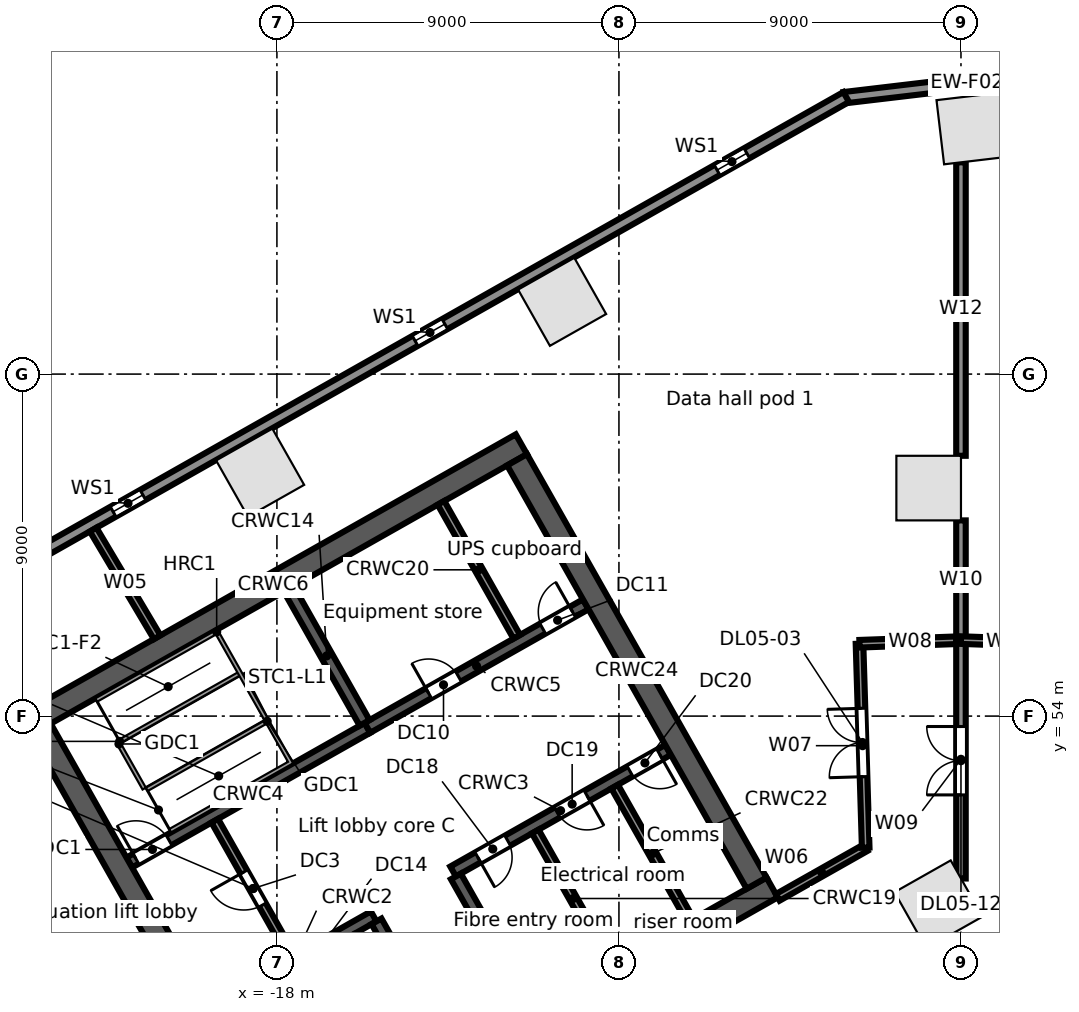
"""IFC4 building model, lengths in metres.
Left out: names, types, materials, properties, quantities, classifications, styles, units other than length and angle.
Written with IfcOpenShell. Run it as: python <this file> out.ifc"""

import sys

from ifc_helpers import new_model, si_unit, direction, frame, frame_2d, origin, origin_2d, place, context, subcontext, project, spatial, rectangle, extrude, element, fill, save


model = new_model("IFC4")
c1 = context("Model", 3, precision=1e-05, world=origin(), true_north=direction((0.0, 1.0)))
c2 = subcontext(c1, "Body", "Model", "MODEL_VIEW")
j1 = project(units=[si_unit("LENGTHUNIT", "METRE"), si_unit("PLANEANGLEUNIT", "RADIAN")], contexts=[c1])
p1 = place(None, origin())
s1 = spatial("IfcSite", under=j1, at=p1, CompositionType="ELEMENT")
p2 = place(p1, origin())
s2 = spatial("IfcBuilding", under=s1, at=p2, CompositionType="ELEMENT")
p3 = place(p2, frame((0.0, 0.0, 31.5)))
s3 = spatial("IfcBuildingStorey", under=s2, at=p3, CompositionType="ELEMENT", Elevation=31.5)
for number, where, z_axis, x_axis in (
    (1, (0.3, 69.464, 0.0), (0.0, 0.0, 1.0), (-0.993, -0.118, 0.0)),
    (2, (-10.495, 64.902, 0.0), (0.0, 0.0, 1.0), (-0.87, -0.492, 0.0)),
    (3, (-18.441, 60.406, 0.0), (0.0, 0.0, 1.0), (-0.87, -0.492, 0.0)),
    (4, (-0.591, 49.044, 0.0), (0.0, 0.0, 1.0), (0.87, 0.492, 0.0)),
    (5, (-0.85, 60.0, 0.0), (0.0, 0.0, 1.0), (0.0, 1.0, 0.0)),
):
    element("IfcColumn", number, at=place(p3, frame(where, z_axis=z_axis, x_axis=x_axis)), inside=s3, PredefinedType="COLUMN", context=c2, shape_type="SweptSolid", body=[
        extrude(rectangle(XDim=1.7, YDim=1.7, at=origin_2d()), origin(), (0.0, 0.0, 1.0), 5.0),
    ])
p4 = place(p3, frame((-3.076, 70.273, 0.0), z_axis=(0.0, 0.0, 1.0), x_axis=(0.993067743007, 0.117543429416, 0.0)))
e6 = element("IfcWall", 6, at=p4, inside=s3, PredefinedType="STANDARD", context=c2, shape_type="SweptSolid", body=[
    extrude(rectangle(XDim=6.516, YDim=0.3, at=frame_2d((3.258, 0.0))), origin(), (0.0, 0.0, 1.0), 4.68),
])
p5 = place(p3, frame((-58.745, 38.764, 0.0), z_axis=(0.0, 0.0, 1.0), x_axis=(0.870355811726, 0.492423355453, 0.0)))
e7 = element("IfcWall", 7, at=p5, inside=s3, PredefinedType="STANDARD", context=c2, shape_type="SweptSolid", body=[
    extrude(rectangle(XDim=64.025, YDim=0.3, at=frame_2d((32.013, 0.0))), origin(), (0.0, 0.0, 1.0), 4.68),
])
p6 = place(p5, frame((60.122, 0.0, 0.6)))
e8 = element("IfcOpeningElement", 8, at=p6, cuts=e7, PredefinedType="OPENING", context=c2, shape_type="SweptSolid", body=[
    extrude(rectangle(XDim=0.9, YDim=3.2, at=frame_2d((0.45, 1.6))), frame((0.0, 0.16, 0.0), z_axis=(0.0, -1.0, 0.0), x_axis=(1.0, 0.0, 0.0)), (0.0, 0.0, 1.0), 0.32),
])
p7 = place(p5, frame((50.992, 0.0, 0.6)))
e9 = element("IfcOpeningElement", 9, at=p7, cuts=e7, PredefinedType="OPENING", context=c2, shape_type="SweptSolid", body=[
    extrude(rectangle(XDim=0.9, YDim=3.2, at=frame_2d((0.45, 1.6))), frame((0.0, 0.16, 0.0), z_axis=(0.0, -1.0, 0.0), x_axis=(1.0, 0.0, 0.0)), (0.0, 0.0, 1.0), 0.32),
])
p8 = place(p5, frame((41.862, 0.0, 0.6)))
e10 = element("IfcOpeningElement", 10, at=p8, cuts=e7, PredefinedType="OPENING", context=c2, shape_type="SweptSolid", body=[
    extrude(rectangle(XDim=0.9, YDim=3.2, at=frame_2d((0.45, 1.6))), frame((0.0, 0.16, 0.0), z_axis=(0.0, -1.0, 0.0), x_axis=(1.0, 0.0, 0.0)), (0.0, 0.0, 1.0), 0.32),
])
p9 = place(p5, frame((32.732, 0.0, 0.6)))
e11 = element("IfcOpeningElement", 11, at=p9, cuts=e7, PredefinedType="OPENING", context=c2, shape_type="SweptSolid", body=[
    extrude(rectangle(XDim=0.9, YDim=3.2, at=frame_2d((0.45, 1.6))), frame((0.0, 0.16, 0.0), z_axis=(0.0, -1.0, 0.0), x_axis=(1.0, 0.0, 0.0)), (0.0, 0.0, 1.0), 0.32),
])
p10 = place(p5, frame((23.602, 0.0, 0.6)))
e12 = element("IfcOpeningElement", 12, at=p10, cuts=e7, PredefinedType="OPENING", context=c2, shape_type="SweptSolid", body=[
    extrude(rectangle(XDim=0.9, YDim=3.2, at=frame_2d((0.45, 1.6))), frame((0.0, 0.16, 0.0), z_axis=(0.0, -1.0, 0.0), x_axis=(1.0, 0.0, 0.0)), (0.0, 0.0, 1.0), 0.32),
])
p11 = place(p5, frame((14.472, 0.0, 0.6)))
e13 = element("IfcOpeningElement", 13, at=p11, cuts=e7, PredefinedType="OPENING", context=c2, shape_type="SweptSolid", body=[
    extrude(rectangle(XDim=0.9, YDim=3.2, at=frame_2d((0.45, 1.6))), frame((0.0, 0.16, 0.0), z_axis=(0.0, -1.0, 0.0), x_axis=(1.0, 0.0, 0.0)), (0.0, 0.0, 1.0), 0.32),
])
p12 = place(p5, frame((5.342, 0.0, 0.6)))
e14 = element("IfcOpeningElement", 14, at=p12, cuts=e7, PredefinedType="OPENING", context=c2, shape_type="SweptSolid", body=[
    extrude(rectangle(XDim=0.9, YDim=3.2, at=frame_2d((0.45, 1.6))), frame((0.0, 0.16, 0.0), z_axis=(0.0, -1.0, 0.0), x_axis=(1.0, 0.0, 0.0)), (0.0, 0.0, 1.0), 0.32),
])
p13 = place(p3, frame((-18.024, 42.104, 0.0), z_axis=(0.0, 0.0, 1.0), x_axis=(0.870360574057, 0.492414937962, 0.0)))
e15 = element("IfcWall", 15, at=p13, inside=s3, PredefinedType="SOLIDWALL", context=c2, shape_type="SweptSolid", body=[
    extrude(rectangle(XDim=15.0, YDim=0.6, at=frame_2d((7.5, 0.0))), origin(), (0.0, 0.0, 1.0), 4.68),
])
p14 = place(p13, frame((6.1, 0.0, 0.0)))
e16 = element("IfcOpeningElement", 16, at=p14, cuts=e15, PredefinedType="OPENING", context=c2, shape_type="SweptSolid", body=[
    extrude(rectangle(XDim=1.2, YDim=2.1, at=frame_2d((0.6, 1.05))), frame((0.0, 0.31, 0.0), z_axis=(0.0, -1.0, 0.0), x_axis=(1.0, 0.0, 0.0)), (0.0, 0.0, 1.0), 0.62),
])
p15 = place(p3, frame((-19.718, 46.316, 0.0), z_axis=(0.0, 0.0, 1.0), x_axis=(0.870353963862, 0.492426621528, 0.0)))
e17 = element("IfcWall", 17, at=p15, inside=s3, PredefinedType="SOLIDWALL", context=c2, shape_type="SweptSolid", body=[
    extrude(rectangle(XDim=4.9, YDim=0.3, at=frame_2d((2.45, 0.0))), origin(), (0.0, 0.0, 1.0), 4.68),
])
p16 = place(p15, frame((0.55, 0.0, 0.0)))
e18 = element("IfcOpeningElement", 18, at=p16, cuts=e17, PredefinedType="OPENING", context=c2, shape_type="SweptSolid", body=[
    extrude(rectangle(XDim=1.1, YDim=2.1, at=frame_2d((0.55, 1.05))), frame((0.0, 0.16, 0.0), z_axis=(0.0, -1.0, 0.0), x_axis=(1.0, 0.0, 0.0)), (0.0, 0.0, 1.0), 0.32),
])
p17 = place(p15, frame((2.85, 0.0, 0.0)))
e19 = element("IfcOpeningElement", 19, at=p17, cuts=e17, PredefinedType="OPENING", context=c2, shape_type="SweptSolid", body=[
    extrude(rectangle(XDim=0.9, YDim=2.1, at=frame_2d((0.45, 1.05))), frame((0.0, 0.16, 0.0), z_axis=(0.0, -1.0, 0.0), x_axis=(1.0, 0.0, 0.0)), (0.0, 0.0, 1.0), 0.32),
])
p18 = place(p3, frame((-13.365, 49.911, 0.0), z_axis=(0.0, 0.0, 1.0), x_axis=(0.870340995471, 0.49244954219, 0.0)))
e20 = element("IfcWall", 20, at=p18, inside=s3, PredefinedType="SOLIDWALL", context=c2, shape_type="SweptSolid", body=[
    extrude(rectangle(XDim=6.5, YDim=0.3, at=frame_2d((3.25, 0.0))), origin(), (0.0, 0.0, 1.0), 4.68),
])
p19 = place(p18, frame((0.75, 0.0, 0.0)))
e21 = element("IfcOpeningElement", 21, at=p19, cuts=e20, PredefinedType="OPENING", context=c2, shape_type="SweptSolid", body=[
    extrude(rectangle(XDim=0.9, YDim=2.1, at=frame_2d((0.45, 1.05))), frame((0.0, 0.16, 0.0), z_axis=(0.0, -1.0, 0.0), x_axis=(1.0, 0.0, 0.0)), (0.0, 0.0, 1.0), 0.32),
])
p20 = place(p18, frame((3.15, 0.0, 0.0)))
e22 = element("IfcOpeningElement", 22, at=p20, cuts=e20, PredefinedType="OPENING", context=c2, shape_type="SweptSolid", body=[
    extrude(rectangle(XDim=0.9, YDim=2.1, at=frame_2d((0.45, 1.05))), frame((0.0, 0.16, 0.0), z_axis=(0.0, -1.0, 0.0), x_axis=(1.0, 0.0, 0.0)), (0.0, 0.0, 1.0), 0.32),
])
p21 = place(p18, frame((5.35, 0.0, 0.0)))
e23 = element("IfcOpeningElement", 23, at=p21, cuts=e20, PredefinedType="OPENING", context=c2, shape_type="SweptSolid", body=[
    extrude(rectangle(XDim=0.9, YDim=2.1, at=frame_2d((0.45, 1.05))), frame((0.0, 0.16, 0.0), z_axis=(0.0, -1.0, 0.0), x_axis=(1.0, 0.0, 0.0)), (0.0, 0.0, 1.0), 0.32),
])
p22 = place(p3, frame((-21.885, 50.146, 0.0), z_axis=(0.0, 0.0, 1.0), x_axis=(0.870359411463, 0.492416992881, 0.0)))
e24 = element("IfcWall", 24, at=p22, inside=s3, PredefinedType="SOLIDWALL", context=c2, shape_type="SweptSolid", body=[
    extrude(rectangle(XDim=7.2, YDim=0.3, at=frame_2d((3.6, 0.0))), origin(), (0.0, 0.0, 1.0), 4.68),
])
p23 = place(p22, frame((0.2, 0.0, 0.0)))
e25 = element("IfcOpeningElement", 25, at=p23, cuts=e24, PredefinedType="OPENING", context=c2, shape_type="SweptSolid", body=[
    extrude(rectangle(XDim=1.0, YDim=2.1, at=frame_2d((0.5, 1.05))), frame((0.0, 0.16, 0.0), z_axis=(0.0, -1.0, 0.0), x_axis=(1.0, 0.0, 0.0)), (0.0, 0.0, 1.0), 0.32),
])
p24 = place(p3, frame((-15.618, 53.691, 0.0), z_axis=(0.0, 0.0, 1.0), x_axis=(0.870356769198, 0.492421663121, 0.0)))
e26 = element("IfcWall", 26, at=p24, inside=s3, PredefinedType="SOLIDWALL", context=c2, shape_type="SweptSolid", body=[
    extrude(rectangle(XDim=6.6, YDim=0.3, at=frame_2d((3.3, 0.0))), origin(), (0.0, 0.0, 1.0), 4.68),
])
p25 = place(p24, frame((1.85, 0.0, 0.0)))
e27 = element("IfcOpeningElement", 27, at=p25, cuts=e26, PredefinedType="OPENING", context=c2, shape_type="SweptSolid", body=[
    extrude(rectangle(XDim=0.9, YDim=2.1, at=frame_2d((0.45, 1.05))), frame((0.0, 0.16, 0.0), z_axis=(0.0, -1.0, 0.0), x_axis=(1.0, 0.0, 0.0)), (0.0, 0.0, 1.0), 0.32),
])
p26 = place(p24, frame((5.3, 0.0, 0.0)))
e28 = element("IfcOpeningElement", 28, at=p26, cuts=e26, PredefinedType="OPENING", context=c2, shape_type="SweptSolid", body=[
    extrude(rectangle(XDim=0.9, YDim=2.1, at=frame_2d((0.45, 1.05))), frame((0.0, 0.16, 0.0), z_axis=(0.0, -1.0, 0.0), x_axis=(1.0, 0.0, 0.0)), (0.0, 0.0, 1.0), 0.32),
])
p27 = place(p3, frame((-24.623, 53.767, 0.0), z_axis=(0.0, 0.0, 1.0), x_axis=(0.870356627484, 0.492421913601, 0.0)))
e29 = element("IfcWall", 29, at=p27, inside=s3, PredefinedType="SOLIDWALL", context=c2, shape_type="SweptSolid", body=[
    extrude(rectangle(XDim=15.0, YDim=0.6, at=frame_2d((7.5, 0.0))), origin(), (0.0, 0.0, 1.0), 4.68),
])
p28 = place(p3, frame((-24.214, 53.654, 0.0), z_axis=(0.0, 0.0, 1.0), x_axis=(0.492441221355, -0.870345703448, 0.0)))
e30 = element("IfcWall", 30, at=p28, inside=s3, PredefinedType="SOLIDWALL", context=c2, shape_type="SweptSolid", body=[
    extrude(rectangle(XDim=12.8, YDim=0.6, at=frame_2d((6.4, 0.0))), origin(), (0.0, 0.0, 1.0), 4.68),
])
p29 = place(p3, frame((-19.635, 51.246, 0.0), z_axis=(0.0, 0.0, 1.0), x_axis=(0.492408451753, -0.87036424366, 0.0)))
e31 = element("IfcWall", 31, at=p29, inside=s3, PredefinedType="PARTITIONING", context=c2, shape_type="SweptSolid", body=[
    extrude(rectangle(XDim=4.1, YDim=0.2, at=frame_2d((2.05, 0.0))), origin(), (0.0, 0.0, 1.0), 4.68),
])
p30 = place(p29, frame((1.55, 0.0, 0.0)))
e32 = element("IfcOpeningElement", 32, at=p30, cuts=e31, PredefinedType="OPENING", context=c2, shape_type="SweptSolid", body=[
    extrude(rectangle(XDim=1.0, YDim=2.1, at=frame_2d((0.5, 1.05))), frame((0.0, 0.11, 0.0), z_axis=(0.0, -1.0, 0.0), x_axis=(1.0, 0.0, 0.0)), (0.0, 0.0, 1.0), 0.22),
])
p31 = place(p3, frame((-15.379, 48.599, 0.0), z_axis=(0.0, 0.0, 1.0), x_axis=(0.492394910396, -0.870371904542, 0.0)))
e33 = element("IfcWall", 33, at=p31, inside=s3, PredefinedType="SOLIDWALL", context=c2, shape_type="SweptSolid", body=[
    extrude(rectangle(XDim=4.05, YDim=0.3, at=frame_2d((2.025, 0.0))), origin(), (0.0, 0.0, 1.0), 4.68),
])
p32 = place(p3, frame((-17.686, 57.347, 0.0), z_axis=(0.0, 0.0, 1.0), x_axis=(0.492420746998, -0.870357287513, 0.0)))
e34 = element("IfcWall", 34, at=p32, inside=s3, PredefinedType="SOLIDWALL", context=c2, shape_type="SweptSolid", body=[
    extrude(rectangle(XDim=4.05, YDim=0.3, at=frame_2d((2.025, 0.0))), origin(), (0.0, 0.0, 1.0), 4.68),
])
p33 = place(p3, frame((-13.291, 49.781, 0.0), z_axis=(0.0, 0.0, 1.0), x_axis=(0.492394910396, -0.870371904542, 0.0)))
e35 = element("IfcWall", 35, at=p33, inside=s3, PredefinedType="SOLIDWALL", context=c2, shape_type="SweptSolid", body=[
    extrude(rectangle(XDim=4.05, YDim=0.3, at=frame_2d((2.025, 0.0))), origin(), (0.0, 0.0, 1.0), 4.68),
])
for number, where, z_axis, x_axis in (
    (36, (-11.202, 50.962, 0.0), (0.0, 0.0, 1.0), (0.492, -0.87, 0.0)),
    (37, (-13.683, 59.612, 0.0), (0.0, 0.0, 1.0), (0.492, -0.87, 0.0)),
):
    element("IfcWall", number, at=place(p3, frame(where, z_axis=z_axis, x_axis=x_axis)), inside=s3, PredefinedType="PARTITIONING", context=c2, shape_type="SweptSolid", body=[
        extrude(rectangle(XDim=4.05, YDim=0.2, at=frame_2d((2.025, 0.0))), origin(), (0.0, 0.0, 1.0), 4.68),
    ])
p34 = place(p3, frame((-9.113, 52.144, 0.0), z_axis=(0.0, 0.0, 1.0), x_axis=(0.492394910396, -0.870371904542, 0.0)))
e38 = element("IfcWall", 38, at=p34, inside=s3, PredefinedType="PARTITIONING", context=c2, shape_type="SweptSolid", body=[
    extrude(rectangle(XDim=4.05, YDim=0.2, at=frame_2d((2.025, 0.0))), origin(), (0.0, 0.0, 1.0), 4.68),
])
p35 = place(p3, frame((-11.681, 60.744, 0.0), z_axis=(0.0, 0.0, 1.0), x_axis=(0.492426772896, -0.870353878221, 0.0)))
e39 = element("IfcWall", 39, at=p35, inside=s3, PredefinedType="SOLIDWALL", context=c2, shape_type="SweptSolid", body=[
    extrude(rectangle(XDim=12.8, YDim=0.6, at=frame_2d((6.4, 0.0))), origin(), (0.0, 0.0, 1.0), 4.68),
])
p36 = place(p3, frame((-22.835, 58.908, 0.0), z_axis=(0.0, 0.0, 1.0), x_axis=(0.511113859879, -0.859513014584, 0.0)))
e40 = element("IfcWall", 40, at=p36, inside=s3, PredefinedType="PARTITIONING", context=c2, shape_type="SweptSolid", body=[
    extrude(rectangle(XDim=3.295, YDim=0.2, at=frame_2d((1.647, 0.0))), origin(), (0.0, 0.0, 1.0), 3.96),
])
p37 = place(p3, frame((-4.821, 49.23, 0.0), z_axis=(0.0, 0.0, 1.0), x_axis=(0.870371217631, 0.492396124598, 0.0)))
e41 = element("IfcWall", 41, at=p37, inside=s3, PredefinedType="PARTITIONING", context=c2, shape_type="SweptSolid", body=[
    extrude(rectangle(XDim=2.659, YDim=0.2, at=frame_2d((1.329, 0.0))), origin(), (0.0, 0.0, 1.0), 4.68),
])
p38 = place(p3, frame((-2.67, 55.904, 0.0), z_axis=(0.0, 0.0, 1.0), x_axis=(0.030338701418, -0.999539675649, 0.0)))
e42 = element("IfcWall", 42, at=p38, inside=s3, PredefinedType="PARTITIONING", context=c2, shape_type="SweptSolid", body=[
    extrude(rectangle(XDim=5.367, YDim=0.2, at=frame_2d((2.684, 0.0))), origin(), (0.0, 0.0, 1.0), 4.68),
])
p39 = place(p38, frame((1.7, 0.0, 0.0)))
e43 = element("IfcOpeningElement", 43, at=p39, cuts=e42, PredefinedType="OPENING", context=c2, shape_type="SweptSolid", body=[
    extrude(rectangle(XDim=1.8, YDim=2.1, at=frame_2d((0.9, 1.05))), frame((0.0, 0.11, 0.0), z_axis=(0.0, -1.0, 0.0), x_axis=(1.0, 0.0, 0.0)), (0.0, 0.0, 1.0), 0.22),
])
p40 = place(p3, frame((-2.67, 55.904, 0.0), z_axis=(0.0, 0.0, 1.0), x_axis=(0.999354913865, 0.03591317494, 0.0)))
e44 = element("IfcWall", 44, at=p40, inside=s3, PredefinedType="PARTITIONING", context=c2, shape_type="SweptSolid", body=[
    extrude(rectangle(XDim=2.672, YDim=0.2, at=frame_2d((1.336, 0.0))), origin(), (0.0, 0.0, 1.0), 3.742),
])
p41 = place(p3, frame((0.0, 49.726, 0.0), z_axis=(0.0, 0.0, 1.0), x_axis=(0.0, 1.0, 0.0)))
e45 = element("IfcWall", 45, at=p41, inside=s3, PredefinedType="PARTITIONING", context=c2, shape_type="SweptSolid", body=[
    extrude(rectangle(XDim=6.274, YDim=0.25, at=frame_2d((3.137, 0.0))), origin(), (0.0, 0.0, 1.0), 4.68),
])
p42 = place(p41, frame((2.2, 0.0, 0.0)))
e46 = element("IfcOpeningElement", 46, at=p42, cuts=e45, PredefinedType="OPENING", context=c2, shape_type="SweptSolid", body=[
    extrude(rectangle(XDim=1.8, YDim=2.1, at=frame_2d((0.9, 1.05))), frame((0.0, 0.135, 0.0), z_axis=(0.0, -1.0, 0.0), x_axis=(1.0, 0.0, 0.0)), (0.0, 0.0, 1.0), 0.27),
])
p43 = place(p3, frame((0.0, 56.0, 0.0), z_axis=(0.0, 0.0, 1.0), x_axis=(0.0, 1.0, 0.0)))
e47 = element("IfcWall", 47, at=p43, inside=s3, PredefinedType="PARTITIONING", context=c2, shape_type="SweptSolid", body=[
    extrude(rectangle(XDim=3.15, YDim=0.25, at=frame_2d((1.575, 0.0))), origin(), (0.0, 0.0, 1.0), 4.68),
])
p44 = place(p3, frame((0.0, 56.0, 0.0), z_axis=(0.0, 0.0, 1.0), x_axis=(0.999349313684, -0.036068673934, 0.0)))
e48 = element("IfcWall", 48, at=p44, inside=s3, PredefinedType="PARTITIONING", context=c2, shape_type="SweptSolid", body=[
    extrude(rectangle(XDim=2.471, YDim=0.2, at=frame_2d((1.235, 0.0))), origin(), (0.0, 0.0, 1.0), 4.68),
])
p45 = place(p3, frame((0.0, 60.85, 0.0), z_axis=(0.0, 0.0, 1.0), x_axis=(0.0, 1.0, 0.0)))
e49 = element("IfcWall", 49, at=p45, inside=s3, PredefinedType="PARTITIONING", context=c2, shape_type="SweptSolid", body=[
    extrude(rectangle(XDim=7.723, YDim=0.25, at=frame_2d((3.861, 0.0))), origin(), (0.0, 0.0, 1.0), 3.952),
])
p46 = place(p6, origin())
e50 = element("IfcWindow", 50, at=p46, inside=s3, PartitioningType="SINGLE_PANEL", PredefinedType="WINDOW", context=c2, shape_type="SweptSolid", body=[
    extrude(rectangle(XDim=0.9, YDim=3.2, at=frame_2d((0.45, 1.6))), frame((0.0, 0.03, 0.0), z_axis=(0.0, -1.0, 0.0), x_axis=(1.0, 0.0, 0.0)), (0.0, 0.0, 1.0), 0.06),
])
fill(e8, e50)
p47 = place(p7, origin())
e51 = element("IfcWindow", 51, at=p47, inside=s3, PartitioningType="SINGLE_PANEL", PredefinedType="WINDOW", context=c2, shape_type="SweptSolid", body=[
    extrude(rectangle(XDim=0.9, YDim=3.2, at=frame_2d((0.45, 1.6))), frame((0.0, 0.03, 0.0), z_axis=(0.0, -1.0, 0.0), x_axis=(1.0, 0.0, 0.0)), (0.0, 0.0, 1.0), 0.06),
])
fill(e9, e51)
p48 = place(p8, origin())
e52 = element("IfcWindow", 52, at=p48, inside=s3, PartitioningType="SINGLE_PANEL", PredefinedType="WINDOW", context=c2, shape_type="SweptSolid", body=[
    extrude(rectangle(XDim=0.9, YDim=3.2, at=frame_2d((0.45, 1.6))), frame((0.0, 0.03, 0.0), z_axis=(0.0, -1.0, 0.0), x_axis=(1.0, 0.0, 0.0)), (0.0, 0.0, 1.0), 0.06),
])
fill(e10, e52)
p49 = place(p23, origin())
e53 = element("IfcDoor", 53, at=p49, inside=s3, OperationType="SINGLE_SWING_LEFT", PredefinedType="DOOR", context=c2, shape_type="SweptSolid", body=[
    extrude(rectangle(XDim=1.0, YDim=2.1, at=frame_2d((0.5, 1.05))), frame((0.0, 0.025, 0.0), z_axis=(0.0, -1.0, 0.0), x_axis=(1.0, 0.0, 0.0)), (0.0, 0.0, 1.0), 0.05),
])
fill(e25, e53)
p50 = place(p30, frame((1.0, 0.0, 0.0), z_axis=(0.0, 0.0, 1.0), x_axis=(-1.0, 0.0, 0.0)))
e54 = element("IfcDoor", 54, at=p50, inside=s3, OperationType="SINGLE_SWING_RIGHT", PredefinedType="DOOR", context=c2, shape_type="SweptSolid", body=[
    extrude(rectangle(XDim=1.0, YDim=2.1, at=frame_2d((0.5, 1.05))), frame((0.0, 0.025, 0.0), z_axis=(0.0, -1.0, 0.0), x_axis=(1.0, 0.0, 0.0)), (0.0, 0.0, 1.0), 0.05),
])
fill(e32, e54)
p51 = place(p25, origin())
e55 = element("IfcDoor", 55, at=p51, inside=s3, OperationType="SINGLE_SWING_LEFT", PredefinedType="DOOR", context=c2, shape_type="SweptSolid", body=[
    extrude(rectangle(XDim=0.9, YDim=2.1, at=frame_2d((0.45, 1.05))), frame((0.0, 0.025, 0.0), z_axis=(0.0, -1.0, 0.0), x_axis=(1.0, 0.0, 0.0)), (0.0, 0.0, 1.0), 0.05),
])
fill(e27, e55)
p52 = place(p26, origin())
e56 = element("IfcDoor", 56, at=p52, inside=s3, OperationType="SINGLE_SWING_RIGHT", PredefinedType="DOOR", context=c2, shape_type="SweptSolid", body=[
    extrude(rectangle(XDim=0.9, YDim=2.1, at=frame_2d((0.45, 1.05))), frame((0.0, 0.025, 0.0), z_axis=(0.0, -1.0, 0.0), x_axis=(1.0, 0.0, 0.0)), (0.0, 0.0, 1.0), 0.05),
])
fill(e28, e56)
p53 = place(p19, frame((0.9, 0.0, 0.0), z_axis=(0.0, 0.0, 1.0), x_axis=(-1.0, 0.0, 0.0)))
e57 = element("IfcDoor", 57, at=p53, inside=s3, OperationType="SINGLE_SWING_RIGHT", PredefinedType="DOOR", context=c2, shape_type="SweptSolid", body=[
    extrude(rectangle(XDim=0.9, YDim=2.1, at=frame_2d((0.45, 1.05))), frame((0.0, 0.025, 0.0), z_axis=(0.0, -1.0, 0.0), x_axis=(1.0, 0.0, 0.0)), (0.0, 0.0, 1.0), 0.05),
])
fill(e21, e57)
p54 = place(p20, frame((0.9, 0.0, 0.0), z_axis=(0.0, 0.0, 1.0), x_axis=(-1.0, 0.0, 0.0)))
e58 = element("IfcDoor", 58, at=p54, inside=s3, OperationType="SINGLE_SWING_LEFT", PredefinedType="DOOR", context=c2, shape_type="SweptSolid", body=[
    extrude(rectangle(XDim=0.9, YDim=2.1, at=frame_2d((0.45, 1.05))), frame((0.0, 0.025, 0.0), z_axis=(0.0, -1.0, 0.0), x_axis=(1.0, 0.0, 0.0)), (0.0, 0.0, 1.0), 0.05),
])
fill(e22, e58)
p55 = place(p21, frame((0.9, 0.0, 0.0), z_axis=(0.0, 0.0, 1.0), x_axis=(-1.0, 0.0, 0.0)))
e59 = element("IfcDoor", 59, at=p55, inside=s3, OperationType="SINGLE_SWING_LEFT", PredefinedType="DOOR", context=c2, shape_type="SweptSolid", body=[
    extrude(rectangle(XDim=0.9, YDim=2.1, at=frame_2d((0.45, 1.05))), frame((0.0, 0.025, 0.0), z_axis=(0.0, -1.0, 0.0), x_axis=(1.0, 0.0, 0.0)), (0.0, 0.0, 1.0), 0.05),
])
fill(e23, e59)
p56 = place(p39, frame((1.8, 0.0, 0.0), z_axis=(0.0, 0.0, 1.0), x_axis=(-1.0, 0.0, 0.0)))
e60 = element("IfcDoor", 60, at=p56, inside=s3, OperationType="DOUBLE_DOOR_SINGLE_SWING", PredefinedType="DOOR", context=c2, shape_type="SweptSolid", body=[
    extrude(rectangle(XDim=1.8, YDim=2.1, at=frame_2d((0.9, 1.05))), frame((0.0, 0.025, 0.0), z_axis=(0.0, -1.0, 0.0), x_axis=(1.0, 0.0, 0.0)), (0.0, 0.0, 1.0), 0.05),
])
fill(e43, e60)
p57 = place(p42, origin())
e61 = element("IfcDoor", 61, at=p57, inside=s3, OperationType="DOUBLE_DOOR_SINGLE_SWING", PredefinedType="DOOR", context=c2, shape_type="SweptSolid", body=[
    extrude(rectangle(XDim=1.8, YDim=2.1, at=frame_2d((0.9, 1.05))), frame((0.0, 0.025, 0.0), z_axis=(0.0, -1.0, 0.0), x_axis=(1.0, 0.0, 0.0)), (0.0, 0.0, 1.0), 0.05),
])
fill(e46, e61)
save(model, sys.argv[1])
